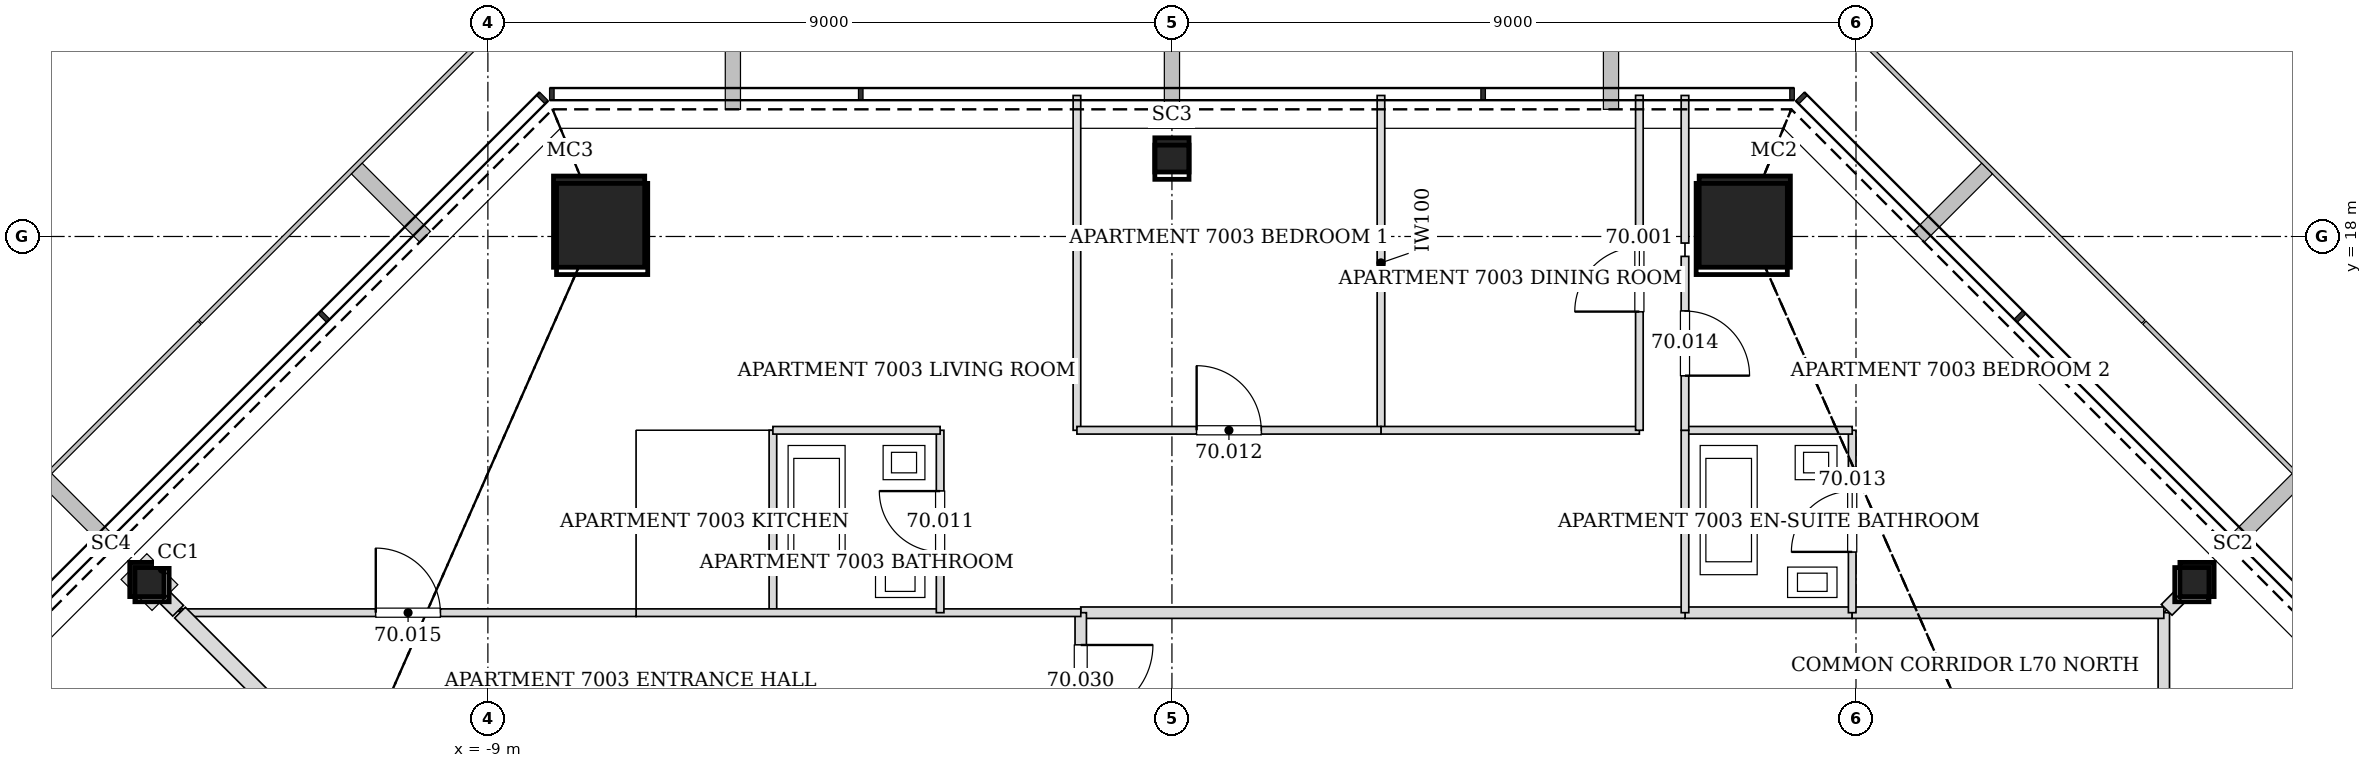
"""IFC4 building model, lengths in metres.
Left out: names, types, materials, properties, quantities, classifications, styles, units other than length and angle.
Written with IfcOpenShell. Run it as: python <this file> out.ifc"""

import sys

from ifc_helpers import new_model, si_unit, direction, frame, frame_2d, origin, origin_2d, place, context, subcontext, project, spatial, rectangle, hollow_rectangle, extrude, element, fill, save


model = new_model("IFC4")
c1 = context("Model", 3, precision=1e-05, world=origin(), true_north=direction((0.0, 1.0)))
c2 = subcontext(c1, "Body", "Model", "MODEL_VIEW")
j1 = project(units=[si_unit("LENGTHUNIT", "METRE"), si_unit("PLANEANGLEUNIT", "RADIAN")], contexts=[c1])
p1 = place(None, origin())
s1 = spatial("IfcSite", under=j1, at=p1, CompositionType="ELEMENT")
p2 = place(p1, origin())
s2 = spatial("IfcBuilding", under=s1, at=p2, CompositionType="ELEMENT")
p3 = place(p2, frame((0.0, 0.0, 287.8)))
s3 = spatial("IfcBuildingStorey", under=s2, at=p3, CompositionType="ELEMENT", Elevation=287.8)
for number, where, z_axis, x_axis in (
    (1, (7.537, 18.195, 0.0), (-0.012, -0.028, 1.0), (0.924, -0.382, 0.0)),
    (2, (-7.537, 18.195, 0.0), (0.012, -0.028, 1.0), (0.924, 0.382, 0.0)),
):
    element("IfcColumn", number, at=place(p3, frame(where, z_axis=z_axis, x_axis=x_axis)), inside=s3, PredefinedType="COLUMN", context=c2, shape_type="SweptSolid", body=[
        extrude(hollow_rectangle(XDim=1.2, YDim=1.2, WallThickness=0.055, at=origin_2d()), origin(), (0.0, 0.0, 1.0), 3.402),
    ])
for number, where, z_axis, x_axis in (
    (3, (13.487, 13.487, 0.0), (-0.02, -0.02, 1.0), (0.707, -0.707, 0.0)),
    (4, (0.0, 19.073, 0.0), (0.0, -0.028, 1.0), (1.0, 0.0, 0.0)),
    (5, (-13.487, 13.487, 0.0), (0.02, -0.02, 1.0), (0.707, 0.707, 0.0)),
):
    element("IfcColumn", number, at=place(p3, frame(where, z_axis=z_axis, x_axis=x_axis)), inside=s3, PredefinedType="COLUMN", context=c2, shape_type="SweptSolid", body=[
        extrude(hollow_rectangle(XDim=0.45, YDim=0.45, WallThickness=0.02, at=origin_2d()), origin(), (0.0, 0.0, 1.0), 3.401),
    ])
p4 = place(p3, frame((13.05, 9.899, 0.0), z_axis=(0.0, 0.0, 1.0), x_axis=(0.0, 1.0, 0.0)))
e6 = element("IfcWall", 6, at=p4, inside=s3, PredefinedType="PARTITIONING", context=c2, shape_type="SweptSolid", body=[
    extrude(rectangle(XDim=3.151, YDim=0.15, at=frame_2d((1.576, 0.0))), origin(), (0.0, 0.0, 1.0), 2.497),
])
p5 = place(p3, frame((8.951, 13.05, 0.0), z_axis=(0.0, 0.0, 1.0), x_axis=(-1.0, 0.0, 0.0)))
e7 = element("IfcWall", 7, at=p5, inside=s3, PredefinedType="PARTITIONING", context=c2, shape_type="SweptSolid", body=[
    extrude(rectangle(XDim=2.202, YDim=0.15, at=frame_2d((1.101, 0.0))), origin(), (0.0, 0.0, 1.0), 3.2),
])
p6 = place(p3, frame((13.05, 13.05, 0.0), z_axis=(0.0, 0.0, 1.0), x_axis=(-1.0, 0.0, 0.0)))
e8 = element("IfcWall", 8, at=p6, inside=s3, PredefinedType="PARTITIONING", context=c2, shape_type="SweptSolid", body=[
    extrude(rectangle(XDim=4.101, YDim=0.15, at=frame_2d((2.051, 0.0))), origin(), (0.0, 0.0, 1.0), 2.497),
])
p7 = place(p3, frame((6.751, 13.05, 0.0), z_axis=(0.0, 0.0, 1.0), x_axis=(-1.0, 0.0, 0.0)))
e9 = element("IfcWall", 9, at=p7, inside=s3, PredefinedType="PARTITIONING", context=c2, shape_type="SweptSolid", body=[
    extrude(rectangle(XDim=7.951, YDim=0.15, at=frame_2d((3.976, 0.0))), origin(), (0.0, 0.0, 1.0), 2.349),
])
p8 = place(p3, frame((-1.2, 13.05, 0.0), z_axis=(0.0, 0.0, 1.0), x_axis=(0.0, -1.0, 0.0)))
e10 = element("IfcWall", 10, at=p8, inside=s3, PredefinedType="PARTITIONING", context=c2, shape_type="SweptSolid", body=[
    extrude(rectangle(XDim=1.8, YDim=0.15, at=frame_2d((0.9, 0.0))), origin(), (0.0, 0.0, 1.0), 3.2),
])
p9 = place(p8, frame((0.425, 0.0, 0.0)))
e11 = element("IfcOpeningElement", 11, at=p9, cuts=e10, PredefinedType="OPENING", context=c2, shape_type="SweptSolid", body=[
    extrude(rectangle(XDim=0.95, YDim=2.1, at=frame_2d((0.475, 1.05))), frame((0.0, 0.085, 0.0), z_axis=(0.0, -1.0, 0.0), x_axis=(1.0, 0.0, 0.0)), (0.0, 0.0, 1.0), 0.17),
])
p10 = place(p3, frame((2.75, 19.855, 0.0), z_axis=(0.0, 0.0, 1.0), x_axis=(0.0, -1.0, 0.0)))
e12 = element("IfcWall", 12, at=p10, inside=s3, PredefinedType="PARTITIONING", context=c2, shape_type="SweptSolid", body=[
    extrude(rectangle(XDim=4.405, YDim=0.1, at=frame_2d((2.203, 0.0))), origin(), (0.0, 0.0, 1.0), 2.73),
])
p11 = place(p3, frame((2.75, 15.45, 0.0), z_axis=(0.0, 0.0, 1.0), x_axis=(1.0, 0.0, 0.0)))
e13 = element("IfcWall", 13, at=p11, inside=s3, PredefinedType="PARTITIONING", context=c2, shape_type="SweptSolid", body=[
    extrude(rectangle(XDim=3.4, YDim=0.1, at=frame_2d((1.7, 0.0))), origin(), (0.0, 0.0, 1.0), 3.2),
])
p12 = place(p3, frame((6.15, 15.45, 0.0), z_axis=(0.0, 0.0, 1.0), x_axis=(0.0, 1.0, 0.0)))
e14 = element("IfcWall", 14, at=p12, inside=s3, PredefinedType="PARTITIONING", context=c2, shape_type="SweptSolid", body=[
    extrude(rectangle(XDim=4.407, YDim=0.1, at=frame_2d((2.204, 0.0))), origin(), (0.0, 0.0, 1.0), 2.73),
])
p13 = place(p12, frame((1.562, 0.0, 0.0)))
e15 = element("IfcOpeningElement", 15, at=p13, cuts=e14, PredefinedType="OPENING", context=c2, shape_type="SweptSolid", body=[
    extrude(rectangle(XDim=0.85, YDim=2.1, at=frame_2d((0.425, 1.05))), frame((0.0, 0.06, 0.0), z_axis=(0.0, -1.0, 0.0), x_axis=(1.0, 0.0, 0.0)), (0.0, 0.0, 1.0), 0.12),
])
p14 = place(p3, frame((13.246, 13.246, 0.0), z_axis=(0.0, 0.0, 1.0), x_axis=(-0.707106781187, -0.707106781187, 0.0)))
e16 = element("IfcWall", 16, at=p14, inside=s3, PredefinedType="PARTITIONING", context=c2, shape_type="SweptSolid", body=[
    extrude(rectangle(XDim=0.224, YDim=0.2, at=frame_2d((0.112, 0.0))), origin(), (0.0, 0.0, 1.0), 2.591),
])
p15 = place(p3, frame((-5.25, 13.05, 0.0), z_axis=(0.0, 0.0, 1.0), x_axis=(0.0, 1.0, 0.0)))
e17 = element("IfcWall", 17, at=p15, inside=s3, PredefinedType="PARTITIONING", context=c2, shape_type="SweptSolid", body=[
    extrude(rectangle(XDim=2.4, YDim=0.1, at=frame_2d((1.2, 0.0))), origin(), (0.0, 0.0, 1.0), 2.591),
])
p16 = place(p3, frame((-7.05, 13.05, 0.0), z_axis=(0.0, 0.0, 1.0), x_axis=(1.0, 0.0, 0.0)))
e18 = element("IfcWall", 18, at=p16, inside=s3, PredefinedType="PARTITIONING", context=c2, shape_type="SweptSolid", body=[
    extrude(rectangle(XDim=5.851, YDim=0.1, at=frame_2d((2.926, 0.0))), origin(), (0.0, 0.0, 1.0), 3.2),
])
p17 = place(p3, frame((-3.05, 13.05, 0.0), z_axis=(0.0, 0.0, 1.0), x_axis=(0.0, 1.0, 0.0)))
e19 = element("IfcWall", 19, at=p17, inside=s3, PredefinedType="PARTITIONING", context=c2, shape_type="SweptSolid", body=[
    extrude(rectangle(XDim=2.4, YDim=0.1, at=frame_2d((1.2, 0.0))), origin(), (0.0, 0.0, 1.0), 2.591),
])
p18 = place(p17, frame((0.8, 0.0, 0.0)))
e20 = element("IfcOpeningElement", 20, at=p18, cuts=e19, PredefinedType="OPENING", context=c2, shape_type="SweptSolid", body=[
    extrude(rectangle(XDim=0.8, YDim=2.1, at=frame_2d((0.4, 1.05))), frame((0.0, 0.06, 0.0), z_axis=(0.0, -1.0, 0.0), x_axis=(1.0, 0.0, 0.0)), (0.0, 0.0, 1.0), 0.12),
])
p19 = place(p3, frame((-3.05, 15.45, 0.0), z_axis=(0.0, 0.0, 1.0), x_axis=(-1.0, 0.0, 0.0)))
e21 = element("IfcWall", 21, at=p19, inside=s3, PredefinedType="PARTITIONING", context=c2, shape_type="SweptSolid", body=[
    extrude(rectangle(XDim=2.2, YDim=0.1, at=frame_2d((1.1, 0.0))), origin(), (0.0, 0.0, 1.0), 3.2),
])
p20 = place(p3, frame((-1.25, 19.855, 0.0), z_axis=(0.0, 0.0, 1.0), x_axis=(0.0, -1.0, 0.0)))
e22 = element("IfcWall", 22, at=p20, inside=s3, PredefinedType="PARTITIONING", context=c2, shape_type="SweptSolid", body=[
    extrude(rectangle(XDim=4.405, YDim=0.1, at=frame_2d((2.203, 0.0))), origin(), (0.0, 0.0, 1.0), 2.73),
])
p21 = place(p3, frame((-1.25, 15.45, 0.0), z_axis=(0.0, 0.0, 1.0), x_axis=(1.0, 0.0, 0.0)))
e23 = element("IfcWall", 23, at=p21, inside=s3, PredefinedType="PARTITIONING", context=c2, shape_type="SweptSolid", body=[
    extrude(rectangle(XDim=4.0, YDim=0.1, at=frame_2d((2.0, 0.0))), origin(), (0.0, 0.0, 1.0), 2.349),
])
p22 = place(p21, frame((1.575, 0.0, 0.0)))
e24 = element("IfcOpeningElement", 24, at=p22, cuts=e23, PredefinedType="OPENING", context=c2, shape_type="SweptSolid", body=[
    extrude(rectangle(XDim=0.85, YDim=2.1, at=frame_2d((0.425, 1.05))), frame((0.0, 0.06, 0.0), z_axis=(0.0, -1.0, 0.0), x_axis=(1.0, 0.0, 0.0)), (0.0, 0.0, 1.0), 0.12),
])
p23 = place(p3, frame((8.95, 13.05, 0.0), z_axis=(0.0, 0.0, 1.0), x_axis=(0.0, 1.0, 0.0)))
e25 = element("IfcWall", 25, at=p23, inside=s3, PredefinedType="PARTITIONING", context=c2, shape_type="SweptSolid", body=[
    extrude(rectangle(XDim=2.4, YDim=0.1, at=frame_2d((1.2, 0.0))), origin(), (0.0, 0.0, 1.0), 2.497),
])
p24 = place(p23, frame((0.8, 0.0, 0.0)))
e26 = element("IfcOpeningElement", 26, at=p24, cuts=e25, PredefinedType="OPENING", context=c2, shape_type="SweptSolid", body=[
    extrude(rectangle(XDim=0.8, YDim=2.1, at=frame_2d((0.4, 1.05))), frame((0.0, 0.06, 0.0), z_axis=(0.0, -1.0, 0.0), x_axis=(1.0, 0.0, 0.0)), (0.0, 0.0, 1.0), 0.12),
])
p25 = place(p3, frame((8.95, 15.45, 0.0), z_axis=(0.0, 0.0, 1.0), x_axis=(-1.0, 0.0, 0.0)))
e27 = element("IfcWall", 27, at=p25, inside=s3, PredefinedType="PARTITIONING", context=c2, shape_type="SweptSolid", body=[
    extrude(rectangle(XDim=2.2, YDim=0.1, at=frame_2d((1.1, 0.0))), origin(), (0.0, 0.0, 1.0), 2.497),
])
p26 = place(p3, frame((6.75, 15.45, 0.0), z_axis=(0.0, 0.0, 1.0), x_axis=(0.0, -1.0, 0.0)))
e28 = element("IfcWall", 28, at=p26, inside=s3, PredefinedType="PARTITIONING", context=c2, shape_type="SweptSolid", body=[
    extrude(rectangle(XDim=2.4, YDim=0.1, at=frame_2d((1.2, 0.0))), origin(), (0.0, 0.0, 1.0), 2.591),
])
p27 = place(p3, frame((6.75, 19.855, 0.0), z_axis=(0.0, 0.0, 1.0), x_axis=(0.0, -1.0, 0.0)))
e29 = element("IfcWall", 29, at=p27, inside=s3, PredefinedType="PARTITIONING", context=c2, shape_type="SweptSolid", body=[
    extrude(rectangle(XDim=1.942, YDim=0.1, at=frame_2d((0.971, 0.0))), origin(), (0.0, 0.0, 1.0), 2.74),
])
p28 = place(p3, frame((6.75, 17.738, 0.0), z_axis=(0.0, 0.0, 1.0), x_axis=(0.0, -1.0, 0.0)))
e30 = element("IfcWall", 30, at=p28, inside=s3, PredefinedType="PARTITIONING", context=c2, shape_type="SweptSolid", body=[
    extrude(rectangle(XDim=2.288, YDim=0.1, at=frame_2d((1.144, 0.0))), origin(), (0.0, 0.0, 1.0), 2.73),
])
p29 = place(p28, frame((0.719, 0.0, 0.0)))
e31 = element("IfcOpeningElement", 31, at=p29, cuts=e30, PredefinedType="OPENING", context=c2, shape_type="SweptSolid", body=[
    extrude(rectangle(XDim=0.85, YDim=2.1, at=frame_2d((0.425, 1.05))), frame((0.0, 0.06, 0.0), z_axis=(0.0, -1.0, 0.0), x_axis=(1.0, 0.0, 0.0)), (0.0, 0.0, 1.0), 0.12),
])
p30 = place(p3, frame((-13.246, 13.246, 0.0), z_axis=(0.0, 0.0, 1.0), x_axis=(0.707106781187, -0.707106781187, 0.0)))
e32 = element("IfcWall", 32, at=p30, inside=s3, PredefinedType="PARTITIONING", context=c2, shape_type="SweptSolid", body=[
    extrude(rectangle(XDim=0.241, YDim=0.2, at=frame_2d((0.121, 0.0))), origin(), (0.0, 0.0, 1.0), 2.591),
])
p31 = place(p3, frame((-13.05, 13.05, 0.0), z_axis=(0.0, 0.0, 1.0), x_axis=(1.0, 0.0, 0.0)))
e33 = element("IfcWall", 33, at=p31, inside=s3, PredefinedType="PARTITIONING", context=c2, shape_type="SweptSolid", body=[
    extrude(rectangle(XDim=6.0, YDim=0.1, at=frame_2d((3.0, 0.0))), origin(), (0.0, 0.0, 1.0), 2.497),
])
p32 = place(p31, frame((2.575, 0.0, 0.0)))
e34 = element("IfcOpeningElement", 34, at=p32, cuts=e33, PredefinedType="OPENING", context=c2, shape_type="SweptSolid", body=[
    extrude(rectangle(XDim=0.85, YDim=2.1, at=frame_2d((0.425, 1.05))), frame((0.0, 0.06, 0.0), z_axis=(0.0, -1.0, 0.0), x_axis=(1.0, 0.0, 0.0)), (0.0, 0.0, 1.0), 0.12),
])
p33 = place(p3, frame((-11.269, 11.269, 0.0), z_axis=(0.0, 0.0, 1.0), x_axis=(-0.707106781187, 0.707106781187, 0.0)))
e35 = element("IfcWall", 35, at=p33, inside=s3, PredefinedType="PARTITIONING", context=c2, shape_type="SweptSolid", body=[
    extrude(rectangle(XDim=2.52, YDim=0.2, at=frame_2d((1.26, 0.0))), origin(), (0.0, 0.0, 1.0), 2.591),
])
p34 = place(p13, origin())
e36 = element("IfcDoor", 36, at=p34, inside=s3, OperationType="SINGLE_SWING_LEFT", PredefinedType="DOOR", context=c2, shape_type="SweptSolid", body=[
    extrude(rectangle(XDim=0.85, YDim=2.1, at=frame_2d((0.425, 1.05))), frame((0.0, 0.025, 0.0), z_axis=(0.0, -1.0, 0.0), x_axis=(1.0, 0.0, 0.0)), (0.0, 0.0, 1.0), 0.05),
])
fill(e15, e36)
p35 = place(p18, origin())
e37 = element("IfcDoor", 37, at=p35, inside=s3, OperationType="SINGLE_SWING_RIGHT", PredefinedType="DOOR", context=c2, shape_type="SweptSolid", body=[
    extrude(rectangle(XDim=0.8, YDim=2.1, at=frame_2d((0.4, 1.05))), frame((0.0, 0.025, 0.0), z_axis=(0.0, -1.0, 0.0), x_axis=(1.0, 0.0, 0.0)), (0.0, 0.0, 1.0), 0.05),
])
fill(e20, e37)
p36 = place(p22, origin())
e38 = element("IfcDoor", 38, at=p36, inside=s3, OperationType="SINGLE_SWING_LEFT", PredefinedType="DOOR", context=c2, shape_type="SweptSolid", body=[
    extrude(rectangle(XDim=0.85, YDim=2.1, at=frame_2d((0.425, 1.05))), frame((0.0, 0.025, 0.0), z_axis=(0.0, -1.0, 0.0), x_axis=(1.0, 0.0, 0.0)), (0.0, 0.0, 1.0), 0.05),
])
fill(e24, e38)
p37 = place(p24, origin())
e39 = element("IfcDoor", 39, at=p37, inside=s3, OperationType="SINGLE_SWING_LEFT", PredefinedType="DOOR", context=c2, shape_type="SweptSolid", body=[
    extrude(rectangle(XDim=0.8, YDim=2.1, at=frame_2d((0.4, 1.05))), frame((0.0, 0.025, 0.0), z_axis=(0.0, -1.0, 0.0), x_axis=(1.0, 0.0, 0.0)), (0.0, 0.0, 1.0), 0.05),
])
fill(e26, e39)
p38 = place(p29, origin())
e40 = element("IfcDoor", 40, at=p38, inside=s3, OperationType="SINGLE_SWING_RIGHT", PredefinedType="DOOR", context=c2, shape_type="SweptSolid", body=[
    extrude(rectangle(XDim=0.85, YDim=2.1, at=frame_2d((0.425, 1.05))), frame((0.0, 0.025, 0.0), z_axis=(0.0, -1.0, 0.0), x_axis=(1.0, 0.0, 0.0)), (0.0, 0.0, 1.0), 0.05),
])
fill(e31, e40)
p39 = place(p32, origin())
e41 = element("IfcDoor", 41, at=p39, inside=s3, OperationType="SINGLE_SWING_LEFT", PredefinedType="DOOR", context=c2, shape_type="SweptSolid", body=[
    extrude(rectangle(XDim=0.85, YDim=2.1, at=frame_2d((0.425, 1.05))), frame((0.0, 0.025, 0.0), z_axis=(0.0, -1.0, 0.0), x_axis=(1.0, 0.0, 0.0)), (0.0, 0.0, 1.0), 0.05),
])
fill(e34, e41)
p40 = place(p9, origin())
e42 = element("IfcDoor", 42, at=p40, inside=s3, OperationType="SINGLE_SWING_LEFT", PredefinedType="DOOR", context=c2, shape_type="SweptSolid", body=[
    extrude(rectangle(XDim=0.95, YDim=2.1, at=frame_2d((0.475, 1.05))), frame((0.0, 0.025, 0.0), z_axis=(0.0, -1.0, 0.0), x_axis=(1.0, 0.0, 0.0)), (0.0, 0.0, 1.0), 0.05),
])
fill(e11, e42)
save(model, sys.argv[1])
